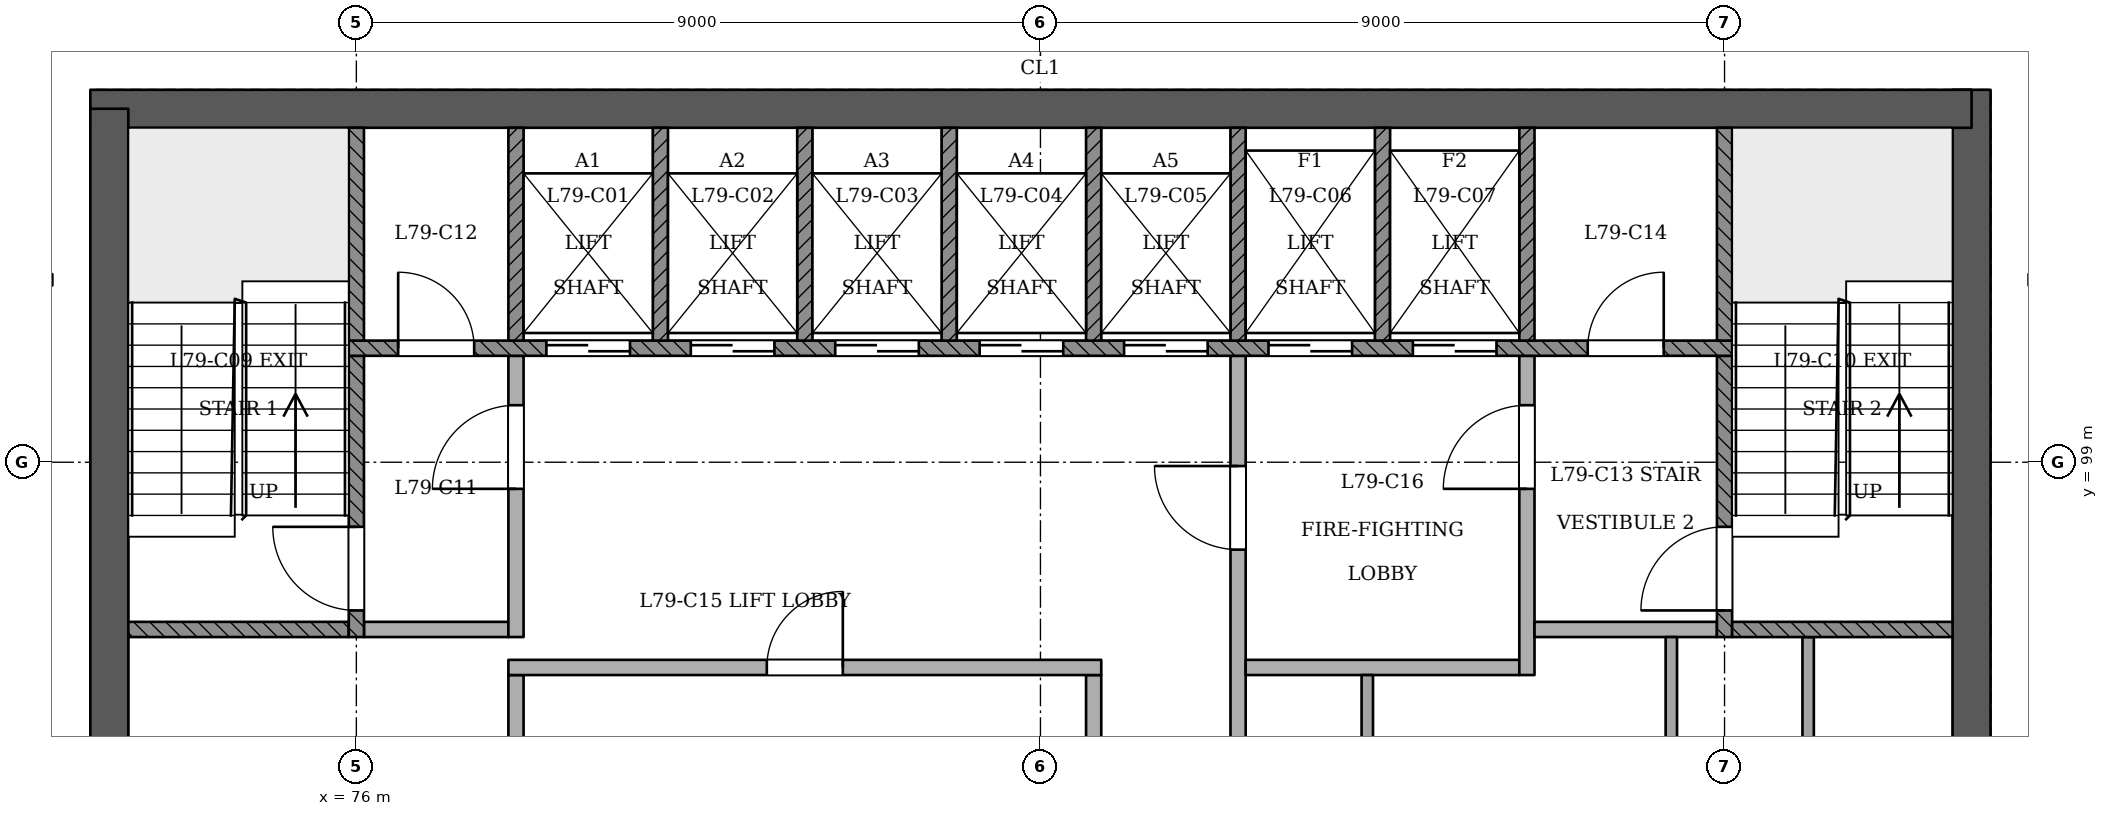
"""IFC4 building model, lengths in metres.
Left out: names, types, materials, properties, quantities, classifications, styles, units other than length and angle.
Written with IfcOpenShell. Run it as: python <this file> out.ifc"""

import sys

from ifc_helpers import new_model, si_unit, direction, frame, frame_2d, origin, place, context, subcontext, project, spatial, rectangle, extrude, element, fill, save


model = new_model("IFC4")
c1 = context("Model", 3, precision=1e-05, world=origin(), true_north=direction((0.0, 1.0)))
c2 = subcontext(c1, "Body", "Model", "MODEL_VIEW")
j1 = project(units=[si_unit("LENGTHUNIT", "METRE"), si_unit("PLANEANGLEUNIT", "RADIAN")], contexts=[c1])
p1 = place(None, origin())
s1 = spatial("IfcSite", under=j1, at=p1, CompositionType="ELEMENT")
p2 = place(p1, origin())
s2 = spatial("IfcBuilding", under=s1, at=p2, CompositionType="ELEMENT")
p3 = place(p2, frame((0.0, 0.0, 305.8)))
s3 = spatial("IfcBuildingStorey", under=s2, at=p3, CompositionType="ELEMENT", Elevation=305.8)
p4 = place(p3, frame((97.25, 93.15, 0.0), z_axis=(0.0, 0.0, 1.0), x_axis=(0.0, 1.0, 0.0)))
e1 = element("IfcWall", 1, at=p4, inside=s3, PredefinedType="SHEAR", context=c2, shape_type="SweptSolid", body=[
    extrude(rectangle(XDim=10.75, YDim=0.5, at=frame_2d((5.375, 0.0))), origin(), (0.0, 0.0, 1.0), 3.6),
])
p5 = place(p3, frame((97.25, 103.65, 0.0), z_axis=(0.0, 0.0, 1.0), x_axis=(-1.0, 0.0, 0.0)))
e2 = element("IfcWall", 2, at=p5, inside=s3, PredefinedType="SHEAR", context=c2, shape_type="SweptSolid", body=[
    extrude(rectangle(XDim=24.75, YDim=0.5, at=frame_2d((12.375, 0.0))), origin(), (0.0, 0.0, 1.0), 3.6),
])
p6 = place(p3, frame((72.75, 103.65, 0.0), z_axis=(0.0, 0.0, 1.0), x_axis=(0.0, -1.0, 0.0)))
e3 = element("IfcWall", 3, at=p6, inside=s3, PredefinedType="SHEAR", context=c2, shape_type="SweptSolid", body=[
    extrude(rectangle(XDim=10.75, YDim=0.5, at=frame_2d((5.375, 0.0))), origin(), (0.0, 0.0, 1.0), 3.6),
])
for number, where, z_axis, x_axis in (
    (4, (78.1, 93.4, 0.0), (0.0, 0.0, 1.0), (0.0, 1.0, 0.0)),
    (5, (85.7, 93.4, 0.0), (0.0, 0.0, 1.0), (0.0, 1.0, 0.0)),
):
    element("IfcWall", number, at=place(p3, frame(where, z_axis=z_axis, x_axis=x_axis)), inside=s3, PredefinedType="PARTITIONING", context=c2, shape_type="SweptSolid", body=[
        extrude(rectangle(XDim=2.8, YDim=0.2, at=frame_2d((1.4, 0.0))), origin(), (0.0, 0.0, 1.0), 3.2),
    ])
p7 = place(p3, frame((87.6, 93.4, 0.0), z_axis=(0.0, 0.0, 1.0), x_axis=(0.0, 1.0, 0.0)))
e6 = element("IfcWall", 6, at=p7, inside=s3, PredefinedType="PARTITIONING", context=c2, shape_type="SweptSolid", body=[
    extrude(rectangle(XDim=7.0, YDim=0.2, at=frame_2d((3.5, 0.0))), origin(), (0.0, 0.0, 1.0), 3.2),
])
p8 = place(p7, frame((4.45, 0.0, 0.0)))
e7 = element("IfcOpeningElement", 7, at=p8, cuts=e6, PredefinedType="OPENING", context=c2, shape_type="SweptSolid", body=[
    extrude(rectangle(XDim=1.1, YDim=2.1, at=frame_2d((0.55, 1.05))), frame((0.0, 0.11, 0.0), z_axis=(0.0, -1.0, 0.0), x_axis=(1.0, 0.0, 0.0)), (0.0, 0.0, 1.0), 0.221),
])
p9 = place(p3, frame((89.3, 93.4, 0.0), z_axis=(0.0, 0.0, 1.0), x_axis=(0.0, 1.0, 0.0)))
e8 = element("IfcWall", 8, at=p9, inside=s3, PredefinedType="PARTITIONING", context=c2, shape_type="SweptSolid", body=[
    extrude(rectangle(XDim=2.8, YDim=0.15, at=frame_2d((1.4, 0.0))), origin(), (0.0, 0.0, 1.0), 3.2),
])
for number, where, z_axis, x_axis in (
    (9, (93.3, 93.4, 0.0), (0.0, 0.0, 1.0), (0.0, 1.0, 0.0)),
    (10, (95.1, 93.4, 0.0), (0.0, 0.0, 1.0), (0.0, 1.0, 0.0)),
):
    element("IfcWall", number, at=place(p3, frame(where, z_axis=z_axis, x_axis=x_axis)), inside=s3, PredefinedType="PARTITIONING", context=c2, shape_type="SweptSolid", body=[
        extrude(rectangle(XDim=3.3, YDim=0.15, at=frame_2d((1.65, 0.0))), origin(), (0.0, 0.0, 1.0), 3.2),
    ])
p10 = place(p3, frame((78.0, 96.3, 0.0), z_axis=(0.0, 0.0, 1.0), x_axis=(1.0, 0.0, 0.0)))
e11 = element("IfcWall", 11, at=p10, inside=s3, PredefinedType="PARTITIONING", context=c2, shape_type="SweptSolid", body=[
    extrude(rectangle(XDim=7.8, YDim=0.2, at=frame_2d((3.9, 0.0))), origin(), (0.0, 0.0, 1.0), 3.2),
])
p11 = place(p10, frame((3.4, 0.0, 0.0)))
e12 = element("IfcOpeningElement", 12, at=p11, cuts=e11, PredefinedType="OPENING", context=c2, shape_type="SweptSolid", body=[
    extrude(rectangle(XDim=1.0, YDim=2.1, at=frame_2d((0.5, 1.05))), frame((0.0, 0.11, 0.0), z_axis=(0.0, -1.0, 0.0), x_axis=(1.0, 0.0, 0.0)), (0.0, 0.0, 1.0), 0.221),
])
p12 = place(p3, frame((87.7, 96.3, 0.0), z_axis=(0.0, 0.0, 1.0), x_axis=(1.0, 0.0, 0.0)))
e13 = element("IfcWall", 13, at=p12, inside=s3, PredefinedType="PARTITIONING", context=c2, shape_type="SweptSolid", body=[
    extrude(rectangle(XDim=3.6, YDim=0.2, at=frame_2d((1.8, 0.0))), origin(), (0.0, 0.0, 1.0), 3.2),
])
p13 = place(p3, frame((91.4, 96.2, 0.0), z_axis=(0.0, 0.0, 1.0), x_axis=(0.0, 1.0, 0.0)))
e14 = element("IfcWall", 14, at=p13, inside=s3, PredefinedType="PARTITIONING", context=c2, shape_type="SweptSolid", body=[
    extrude(rectangle(XDim=4.2, YDim=0.2, at=frame_2d((2.1, 0.0))), origin(), (0.0, 0.0, 1.0), 3.2),
])
p14 = place(p13, frame((2.45, 0.0, 0.0)))
e15 = element("IfcOpeningElement", 15, at=p14, cuts=e14, PredefinedType="OPENING", context=c2, shape_type="SweptSolid", body=[
    extrude(rectangle(XDim=1.1, YDim=2.1, at=frame_2d((0.55, 1.05))), frame((0.0, 0.11, 0.0), z_axis=(0.0, -1.0, 0.0), x_axis=(1.0, 0.0, 0.0)), (0.0, 0.0, 1.0), 0.221),
])
p15 = place(p3, frame((73.0, 96.8, 0.0), z_axis=(0.0, 0.0, 1.0), x_axis=(1.0, 0.0, 0.0)))
e16 = element("IfcWall", 16, at=p15, inside=s3, PredefinedType="SOLIDWALL", context=c2, shape_type="SweptSolid", body=[
    extrude(rectangle(XDim=2.9, YDim=0.2, at=frame_2d((1.45, 0.0))), origin(), (0.0, 0.0, 1.0), 3.2),
])
p16 = place(p3, frame((76.0, 96.7, 0.0), z_axis=(0.0, 0.0, 1.0), x_axis=(0.0, 1.0, 0.0)))
e17 = element("IfcWall", 17, at=p16, inside=s3, PredefinedType="SOLIDWALL", context=c2, shape_type="SweptSolid", body=[
    extrude(rectangle(XDim=3.7, YDim=0.2, at=frame_2d((1.85, 0.0))), origin(), (0.0, 0.0, 1.0), 3.2),
])
p17 = place(p16, frame((0.35, 0.0, 0.0)))
e18 = element("IfcOpeningElement", 18, at=p17, cuts=e17, PredefinedType="OPENING", context=c2, shape_type="SweptSolid", body=[
    extrude(rectangle(XDim=1.1, YDim=2.1, at=frame_2d((0.55, 1.05))), frame((0.0, 0.11, 0.0), z_axis=(0.0, -1.0, 0.0), x_axis=(1.0, 0.0, 0.0)), (0.0, 0.0, 1.0), 0.221),
])
p18 = place(p3, frame((76.1, 96.8, 0.0), z_axis=(0.0, 0.0, 1.0), x_axis=(1.0, 0.0, 0.0)))
e19 = element("IfcWall", 19, at=p18, inside=s3, PredefinedType="PARTITIONING", context=c2, shape_type="SweptSolid", body=[
    extrude(rectangle(XDim=1.9, YDim=0.2, at=frame_2d((0.95, 0.0))), origin(), (0.0, 0.0, 1.0), 3.2),
])
p19 = place(p3, frame((78.1, 96.7, 0.0), z_axis=(0.0, 0.0, 1.0), x_axis=(0.0, 1.0, 0.0)))
e20 = element("IfcWall", 20, at=p19, inside=s3, PredefinedType="PARTITIONING", context=c2, shape_type="SweptSolid", body=[
    extrude(rectangle(XDim=3.7, YDim=0.2, at=frame_2d((1.85, 0.0))), origin(), (0.0, 0.0, 1.0), 3.2),
])
p20 = place(p19, frame((1.95, 0.0, 0.0)))
e21 = element("IfcOpeningElement", 21, at=p20, cuts=e20, PredefinedType="OPENING", context=c2, shape_type="SweptSolid", body=[
    extrude(rectangle(XDim=1.1, YDim=2.1, at=frame_2d((0.55, 1.05))), frame((0.0, 0.11, 0.0), z_axis=(0.0, -1.0, 0.0), x_axis=(1.0, 0.0, 0.0)), (0.0, 0.0, 1.0), 0.221),
])
p21 = place(p3, frame((91.5, 96.8, 0.0), z_axis=(0.0, 0.0, 1.0), x_axis=(1.0, 0.0, 0.0)))
e22 = element("IfcWall", 22, at=p21, inside=s3, PredefinedType="PARTITIONING", context=c2, shape_type="SweptSolid", body=[
    extrude(rectangle(XDim=2.4, YDim=0.2, at=frame_2d((1.2, 0.0))), origin(), (0.0, 0.0, 1.0), 3.2),
])
p22 = place(p3, frame((94.0, 96.7, 0.0), z_axis=(0.0, 0.0, 1.0), x_axis=(0.0, 1.0, 0.0)))
e23 = element("IfcWall", 23, at=p22, inside=s3, PredefinedType="SOLIDWALL", context=c2, shape_type="SweptSolid", body=[
    extrude(rectangle(XDim=3.7, YDim=0.2, at=frame_2d((1.85, 0.0))), origin(), (0.0, 0.0, 1.0), 3.2),
])
p23 = place(p22, frame((0.35, 0.0, 0.0)))
e24 = element("IfcOpeningElement", 24, at=p23, cuts=e23, PredefinedType="OPENING", context=c2, shape_type="SweptSolid", body=[
    extrude(rectangle(XDim=1.1, YDim=2.1, at=frame_2d((0.55, 1.05))), frame((0.0, 0.11, 0.0), z_axis=(0.0, -1.0, 0.0), x_axis=(1.0, 0.0, 0.0)), (0.0, 0.0, 1.0), 0.221),
])
p24 = place(p3, frame((94.1, 96.8, 0.0), z_axis=(0.0, 0.0, 1.0), x_axis=(1.0, 0.0, 0.0)))
e25 = element("IfcWall", 25, at=p24, inside=s3, PredefinedType="SOLIDWALL", context=c2, shape_type="SweptSolid", body=[
    extrude(rectangle(XDim=2.9, YDim=0.2, at=frame_2d((1.45, 0.0))), origin(), (0.0, 0.0, 1.0), 3.2),
])
p25 = place(p3, frame((75.9, 100.5, 0.0), z_axis=(0.0, 0.0, 1.0), x_axis=(1.0, 0.0, 0.0)))
e26 = element("IfcWall", 26, at=p25, inside=s3, PredefinedType="SOLIDWALL", context=c2, shape_type="SweptSolid", body=[
    extrude(rectangle(XDim=18.2, YDim=0.2, at=frame_2d((9.1, 0.0))), origin(), (0.0, 0.0, 1.0), 3.2),
])
p26 = place(p25, frame((2.6, 0.0, 0.0)))
e27 = element("IfcOpeningElement", 27, at=p26, cuts=e26, PredefinedType="OPENING", context=c2, shape_type="SweptSolid", body=[
    extrude(rectangle(XDim=1.1, YDim=2.1, at=frame_2d((0.55, 1.05))), frame((0.0, 0.11, 0.0), z_axis=(0.0, -1.0, 0.0), x_axis=(1.0, 0.0, 0.0)), (0.0, 0.0, 1.0), 0.221),
])
p27 = place(p25, frame((4.5, 0.0, 0.0)))
e28 = element("IfcOpeningElement", 28, at=p27, cuts=e26, PredefinedType="OPENING", context=c2, shape_type="SweptSolid", body=[
    extrude(rectangle(XDim=1.1, YDim=2.1, at=frame_2d((0.55, 1.05))), frame((0.0, 0.11, 0.0), z_axis=(0.0, -1.0, 0.0), x_axis=(1.0, 0.0, 0.0)), (0.0, 0.0, 1.0), 0.221),
])
p28 = place(p25, frame((6.4, 0.0, 0.0)))
e29 = element("IfcOpeningElement", 29, at=p28, cuts=e26, PredefinedType="OPENING", context=c2, shape_type="SweptSolid", body=[
    extrude(rectangle(XDim=1.1, YDim=2.1, at=frame_2d((0.55, 1.05))), frame((0.0, 0.11, 0.0), z_axis=(0.0, -1.0, 0.0), x_axis=(1.0, 0.0, 0.0)), (0.0, 0.0, 1.0), 0.221),
])
p29 = place(p25, frame((8.3, 0.0, 0.0)))
e30 = element("IfcOpeningElement", 30, at=p29, cuts=e26, PredefinedType="OPENING", context=c2, shape_type="SweptSolid", body=[
    extrude(rectangle(XDim=1.1, YDim=2.1, at=frame_2d((0.55, 1.05))), frame((0.0, 0.11, 0.0), z_axis=(0.0, -1.0, 0.0), x_axis=(1.0, 0.0, 0.0)), (0.0, 0.0, 1.0), 0.221),
])
p30 = place(p25, frame((10.2, 0.0, 0.0)))
e31 = element("IfcOpeningElement", 31, at=p30, cuts=e26, PredefinedType="OPENING", context=c2, shape_type="SweptSolid", body=[
    extrude(rectangle(XDim=1.1, YDim=2.1, at=frame_2d((0.55, 1.05))), frame((0.0, 0.11, 0.0), z_axis=(0.0, -1.0, 0.0), x_axis=(1.0, 0.0, 0.0)), (0.0, 0.0, 1.0), 0.221),
])
p31 = place(p25, frame((12.1, 0.0, 0.0)))
e32 = element("IfcOpeningElement", 32, at=p31, cuts=e26, PredefinedType="OPENING", context=c2, shape_type="SweptSolid", body=[
    extrude(rectangle(XDim=1.1, YDim=2.1, at=frame_2d((0.55, 1.05))), frame((0.0, 0.11, 0.0), z_axis=(0.0, -1.0, 0.0), x_axis=(1.0, 0.0, 0.0)), (0.0, 0.0, 1.0), 0.221),
])
p32 = place(p25, frame((14.0, 0.0, 0.0)))
e33 = element("IfcOpeningElement", 33, at=p32, cuts=e26, PredefinedType="OPENING", context=c2, shape_type="SweptSolid", body=[
    extrude(rectangle(XDim=1.1, YDim=2.1, at=frame_2d((0.55, 1.05))), frame((0.0, 0.11, 0.0), z_axis=(0.0, -1.0, 0.0), x_axis=(1.0, 0.0, 0.0)), (0.0, 0.0, 1.0), 0.221),
])
p33 = place(p25, frame((0.65, 0.0, 0.0)))
e34 = element("IfcOpeningElement", 34, at=p33, cuts=e26, PredefinedType="OPENING", context=c2, shape_type="SweptSolid", body=[
    extrude(rectangle(XDim=1.0, YDim=2.1, at=frame_2d((0.5, 1.05))), frame((0.0, 0.11, 0.0), z_axis=(0.0, -1.0, 0.0), x_axis=(1.0, 0.0, 0.0)), (0.0, 0.0, 1.0), 0.221),
])
p34 = place(p25, frame((16.3, 0.0, 0.0)))
e35 = element("IfcOpeningElement", 35, at=p34, cuts=e26, PredefinedType="OPENING", context=c2, shape_type="SweptSolid", body=[
    extrude(rectangle(XDim=1.0, YDim=2.1, at=frame_2d((0.5, 1.05))), frame((0.0, 0.11, 0.0), z_axis=(0.0, -1.0, 0.0), x_axis=(1.0, 0.0, 0.0)), (0.0, 0.0, 1.0), 0.221),
])
for number, where, z_axis, x_axis in (
    (36, (76.0, 100.6, 0.0), (0.0, 0.0, 1.0), (0.0, 1.0, 0.0)),
    (37, (78.1, 100.6, 0.0), (0.0, 0.0, 1.0), (0.0, 1.0, 0.0)),
    (38, (80.0, 100.6, 0.0), (0.0, 0.0, 1.0), (0.0, 1.0, 0.0)),
    (39, (81.9, 100.6, 0.0), (0.0, 0.0, 1.0), (0.0, 1.0, 0.0)),
    (40, (83.8, 100.6, 0.0), (0.0, 0.0, 1.0), (0.0, 1.0, 0.0)),
    (41, (85.7, 100.6, 0.0), (0.0, 0.0, 1.0), (0.0, 1.0, 0.0)),
    (42, (87.6, 100.6, 0.0), (0.0, 0.0, 1.0), (0.0, 1.0, 0.0)),
    (43, (89.5, 100.6, 0.0), (0.0, 0.0, 1.0), (0.0, 1.0, 0.0)),
    (44, (91.4, 100.6, 0.0), (0.0, 0.0, 1.0), (0.0, 1.0, 0.0)),
    (45, (94.0, 100.6, 0.0), (0.0, 0.0, 1.0), (0.0, 1.0, 0.0)),
):
    element("IfcWall", number, at=place(p3, frame(where, z_axis=z_axis, x_axis=x_axis)), inside=s3, PredefinedType="SOLIDWALL", context=c2, shape_type="SweptSolid", body=[
        extrude(rectangle(XDim=2.8, YDim=0.2, at=frame_2d((1.4, 0.0))), origin(), (0.0, 0.0, 1.0), 3.2),
    ])
p35 = place(p26, origin())
e46 = element("IfcDoor", 46, at=p35, inside=s3, OperationType="SLIDING_TO_RIGHT", PredefinedType="NOTDEFINED", context=c2, shape_type="SweptSolid", body=[
    extrude(rectangle(XDim=1.1, YDim=2.1, at=frame_2d((0.55, 1.05))), frame((0.0, 0.025, 0.0), z_axis=(0.0, -1.0, 0.0), x_axis=(1.0, 0.0, 0.0)), (0.0, 0.0, 1.0), 0.05),
])
fill(e27, e46)
p36 = place(p27, origin())
e47 = element("IfcDoor", 47, at=p36, inside=s3, OperationType="SLIDING_TO_LEFT", PredefinedType="NOTDEFINED", context=c2, shape_type="SweptSolid", body=[
    extrude(rectangle(XDim=1.1, YDim=2.1, at=frame_2d((0.55, 1.05))), frame((0.0, 0.025, 0.0), z_axis=(0.0, -1.0, 0.0), x_axis=(1.0, 0.0, 0.0)), (0.0, 0.0, 1.0), 0.05),
])
fill(e28, e47)
p37 = place(p28, origin())
e48 = element("IfcDoor", 48, at=p37, inside=s3, OperationType="SLIDING_TO_RIGHT", PredefinedType="NOTDEFINED", context=c2, shape_type="SweptSolid", body=[
    extrude(rectangle(XDim=1.1, YDim=2.1, at=frame_2d((0.55, 1.05))), frame((0.0, 0.025, 0.0), z_axis=(0.0, -1.0, 0.0), x_axis=(1.0, 0.0, 0.0)), (0.0, 0.0, 1.0), 0.05),
])
fill(e29, e48)
p38 = place(p29, origin())
e49 = element("IfcDoor", 49, at=p38, inside=s3, OperationType="SLIDING_TO_LEFT", PredefinedType="NOTDEFINED", context=c2, shape_type="SweptSolid", body=[
    extrude(rectangle(XDim=1.1, YDim=2.1, at=frame_2d((0.55, 1.05))), frame((0.0, 0.025, 0.0), z_axis=(0.0, -1.0, 0.0), x_axis=(1.0, 0.0, 0.0)), (0.0, 0.0, 1.0), 0.05),
])
fill(e30, e49)
p39 = place(p30, origin())
e50 = element("IfcDoor", 50, at=p39, inside=s3, OperationType="SLIDING_TO_RIGHT", PredefinedType="NOTDEFINED", context=c2, shape_type="SweptSolid", body=[
    extrude(rectangle(XDim=1.1, YDim=2.1, at=frame_2d((0.55, 1.05))), frame((0.0, 0.025, 0.0), z_axis=(0.0, -1.0, 0.0), x_axis=(1.0, 0.0, 0.0)), (0.0, 0.0, 1.0), 0.05),
])
fill(e31, e50)
p40 = place(p31, origin())
e51 = element("IfcDoor", 51, at=p40, inside=s3, OperationType="SLIDING_TO_RIGHT", PredefinedType="NOTDEFINED", context=c2, shape_type="SweptSolid", body=[
    extrude(rectangle(XDim=1.1, YDim=2.1, at=frame_2d((0.55, 1.05))), frame((0.0, 0.025, 0.0), z_axis=(0.0, -1.0, 0.0), x_axis=(1.0, 0.0, 0.0)), (0.0, 0.0, 1.0), 0.05),
])
fill(e32, e51)
p41 = place(p32, origin())
e52 = element("IfcDoor", 52, at=p41, inside=s3, OperationType="SLIDING_TO_LEFT", PredefinedType="NOTDEFINED", context=c2, shape_type="SweptSolid", body=[
    extrude(rectangle(XDim=1.1, YDim=2.1, at=frame_2d((0.55, 1.05))), frame((0.0, 0.025, 0.0), z_axis=(0.0, -1.0, 0.0), x_axis=(1.0, 0.0, 0.0)), (0.0, 0.0, 1.0), 0.05),
])
fill(e33, e52)
p42 = place(p17, origin())
e53 = element("IfcDoor", 53, at=p42, inside=s3, OperationType="SINGLE_SWING_RIGHT", PredefinedType="NOTDEFINED", context=c2, shape_type="SweptSolid", body=[
    extrude(rectangle(XDim=1.1, YDim=2.1, at=frame_2d((0.55, 1.05))), frame((0.0, 0.025, 0.0), z_axis=(0.0, -1.0, 0.0), x_axis=(1.0, 0.0, 0.0)), (0.0, 0.0, 1.0), 0.05),
])
fill(e18, e53)
p43 = place(p23, origin())
e54 = element("IfcDoor", 54, at=p43, inside=s3, OperationType="SINGLE_SWING_LEFT", PredefinedType="NOTDEFINED", context=c2, shape_type="SweptSolid", body=[
    extrude(rectangle(XDim=1.1, YDim=2.1, at=frame_2d((0.55, 1.05))), frame((0.0, 0.025, 0.0), z_axis=(0.0, -1.0, 0.0), x_axis=(1.0, 0.0, 0.0)), (0.0, 0.0, 1.0), 0.05),
])
fill(e24, e54)
p44 = place(p20, origin())
e55 = element("IfcDoor", 55, at=p44, inside=s3, OperationType="SINGLE_SWING_LEFT", PredefinedType="NOTDEFINED", context=c2, shape_type="SweptSolid", body=[
    extrude(rectangle(XDim=1.1, YDim=2.1, at=frame_2d((0.55, 1.05))), frame((0.0, 0.025, 0.0), z_axis=(0.0, -1.0, 0.0), x_axis=(1.0, 0.0, 0.0)), (0.0, 0.0, 1.0), 0.05),
])
fill(e21, e55)
p45 = place(p8, origin())
e56 = element("IfcDoor", 56, at=p45, inside=s3, OperationType="SINGLE_SWING_RIGHT", PredefinedType="NOTDEFINED", context=c2, shape_type="SweptSolid", body=[
    extrude(rectangle(XDim=1.1, YDim=2.1, at=frame_2d((0.55, 1.05))), frame((0.0, 0.025, 0.0), z_axis=(0.0, -1.0, 0.0), x_axis=(1.0, 0.0, 0.0)), (0.0, 0.0, 1.0), 0.05),
])
fill(e7, e56)
p46 = place(p14, origin())
e57 = element("IfcDoor", 57, at=p46, inside=s3, OperationType="SINGLE_SWING_LEFT", PredefinedType="NOTDEFINED", context=c2, shape_type="SweptSolid", body=[
    extrude(rectangle(XDim=1.1, YDim=2.1, at=frame_2d((0.55, 1.05))), frame((0.0, 0.025, 0.0), z_axis=(0.0, -1.0, 0.0), x_axis=(1.0, 0.0, 0.0)), (0.0, 0.0, 1.0), 0.05),
])
fill(e15, e57)
p47 = place(p33, origin())
e58 = element("IfcDoor", 58, at=p47, inside=s3, OperationType="SINGLE_SWING_LEFT", PredefinedType="NOTDEFINED", context=c2, shape_type="SweptSolid", body=[
    extrude(rectangle(XDim=1.0, YDim=2.1, at=frame_2d((0.5, 1.05))), frame((0.0, 0.025, 0.0), z_axis=(0.0, -1.0, 0.0), x_axis=(1.0, 0.0, 0.0)), (0.0, 0.0, 1.0), 0.05),
])
fill(e34, e58)
p48 = place(p34, origin())
e59 = element("IfcDoor", 59, at=p48, inside=s3, OperationType="SINGLE_SWING_RIGHT", PredefinedType="NOTDEFINED", context=c2, shape_type="SweptSolid", body=[
    extrude(rectangle(XDim=1.0, YDim=2.1, at=frame_2d((0.5, 1.05))), frame((0.0, 0.025, 0.0), z_axis=(0.0, -1.0, 0.0), x_axis=(1.0, 0.0, 0.0)), (0.0, 0.0, 1.0), 0.05),
])
fill(e35, e59)
p49 = place(p11, origin())
e60 = element("IfcDoor", 60, at=p49, inside=s3, OperationType="SINGLE_SWING_RIGHT", PredefinedType="NOTDEFINED", context=c2, shape_type="SweptSolid", body=[
    extrude(rectangle(XDim=1.0, YDim=2.1, at=frame_2d((0.5, 1.05))), frame((0.0, 0.025, 0.0), z_axis=(0.0, -1.0, 0.0), x_axis=(1.0, 0.0, 0.0)), (0.0, 0.0, 1.0), 0.05),
])
fill(e12, e60)
save(model, sys.argv[1])
